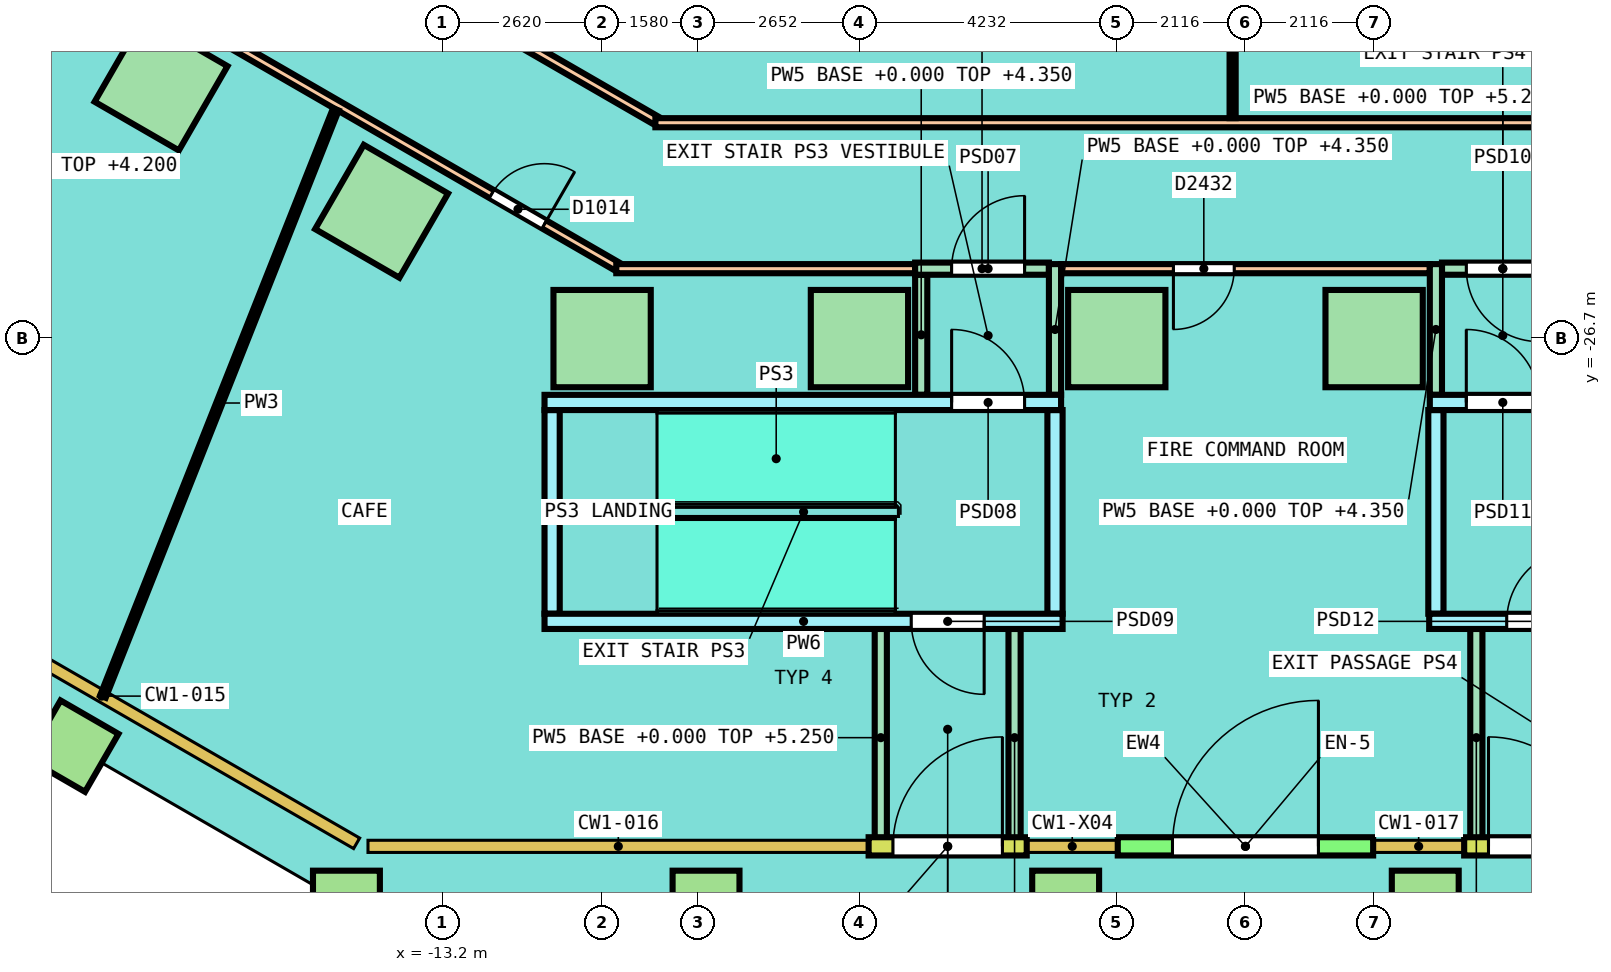
"""IFC4 building model, lengths in metres.
Left out: names, types, materials, properties, quantities, classifications, styles, units other than length and angle.
Written with IfcOpenShell. Run it as: python <this file> out.ifc"""

import sys

from ifc_helpers import new_model, si_unit, direction, frame, frame_2d, origin, origin_2d, place, context, subcontext, project, spatial, rectangle, extrude, element, fill, save


model = new_model("IFC4")
c1 = context("Model", 3, precision=1e-05, world=origin(), true_north=direction((0.0, 1.0)))
c2 = subcontext(c1, "Body", "Model", "MODEL_VIEW")
j1 = project(units=[si_unit("LENGTHUNIT", "METRE"), si_unit("PLANEANGLEUNIT", "RADIAN")], contexts=[c1])
p1 = place(None, origin())
s1 = spatial("IfcSite", under=j1, at=p1, CompositionType="ELEMENT")
p2 = place(p1, origin())
s2 = spatial("IfcBuilding", under=s1, at=p2, CompositionType="ELEMENT")
p3 = place(p2, origin())
s3 = spatial("IfcBuildingStorey", under=s2, at=p3, CompositionType="ELEMENT", Elevation=0.0)
for number, where, z_axis, x_axis in (
    (1, (-17.833, -22.512, 0.0), (0.0, 0.0, 1.0), (0.866, -0.5, 0.0)),
    (2, (-14.206, -24.606, 0.0), (0.0, 0.0, 1.0), (0.866, -0.5, 0.0)),
    (3, (-10.58, -26.7, 0.0), (0.0, 0.0, 1.0), (1.0, 0.0, 0.0)),
    (4, (-6.348, -26.7, 0.0), (0.0, 0.0, 1.0), (1.0, 0.0, 0.0)),
    (5, (-2.116, -26.7, 0.0), (0.0, 0.0, 1.0), (1.0, 0.0, 0.0)),
    (6, (2.116, -26.7, 0.0), (0.0, 0.0, 1.0), (1.0, 0.0, 0.0)),
):
    element("IfcColumn", number, at=place(p3, frame(where, z_axis=z_axis, x_axis=x_axis)), inside=s3, PredefinedType="COLUMN", context=c2, shape_type="SweptSolid", body=[
        extrude(rectangle(XDim=1.6, YDim=1.6, at=origin_2d()), origin(), (0.0, 0.0, 1.0), 5.25),
    ])
for number, where, z_axis, x_axis in (
    (7, (-19.285, -33.402, -0.35), (0.0, 0.0, 1.0), (0.866, -0.5, 0.0)),
    (8, (-14.785, -36.0, -0.35), (0.0, 0.0, 1.0), (1.0, 0.0, 0.0)),
    (9, (-8.871, -36.0, -0.35), (0.0, 0.0, 1.0), (1.0, 0.0, 0.0)),
    (10, (-2.957, -36.0, -0.35), (0.0, 0.0, 1.0), (1.0, 0.0, 0.0)),
    (11, (2.957, -36.0, -0.35), (0.0, 0.0, 1.0), (1.0, 0.0, 0.0)),
):
    element("IfcColumn", number, at=place(p3, frame(where, z_axis=z_axis, x_axis=x_axis)), inside=s3, PredefinedType="COLUMN", context=c2, shape_type="SweptSolid", body=[
        extrude(rectangle(XDim=1.1, YDim=1.1, at=origin_2d()), origin(), (0.0, 0.0, 1.0), 5.6),
    ])
p4 = place(p3, frame((-2.1, -35.05, 0.0), z_axis=(0.0, 0.0, 1.0), x_axis=(1.0, 0.0, 0.0)))
e12 = element("IfcWall", 12, at=p4, inside=s3, PredefinedType="SOLIDWALL", context=c2, shape_type="SweptSolid", body=[
    extrude(rectangle(XDim=4.2, YDim=0.3, at=frame_2d((2.1, 0.0))), origin(), (0.0, 0.0, 1.0), 5.25),
])
p5 = place(p4, frame((0.9, 0.0, 0.0)))
e13 = element("IfcOpeningElement", 13, at=p5, cuts=e12, PredefinedType="OPENING", context=c2, shape_type="SweptSolid", body=[
    extrude(rectangle(XDim=2.4, YDim=3.0, at=frame_2d((1.2, 1.5))), frame((0.0, 0.16, 0.0), z_axis=(0.0, -1.0, 0.0), x_axis=(1.0, 0.0, 0.0)), (0.0, 0.0, 1.0), 0.32),
])
p6 = place(p3, frame((-6.197, -35.05, 0.0), z_axis=(0.0, 0.0, 1.0), x_axis=(1.0, 0.0, 0.0)))
e14 = element("IfcWall", 14, at=p6, inside=s3, PredefinedType="SOLIDWALL", context=c2, shape_type="SweptSolid", body=[
    extrude(rectangle(XDim=2.6, YDim=0.3, at=frame_2d((1.3, 0.0))), origin(), (0.0, 0.0, 1.0), 5.25),
])
p7 = place(p6, frame((2.2, 0.0, 0.0), z_axis=(0.0, 0.0, 1.0), x_axis=(-1.0, 0.0, 0.0)))
e15 = element("IfcOpeningElement", 15, at=p7, cuts=e14, PredefinedType="OPENING", context=c2, shape_type="SweptSolid", body=[
    extrude(rectangle(XDim=1.8, YDim=2.4, at=frame_2d((0.9, 1.2))), frame((0.0, 0.16, 0.0), z_axis=(0.0, -1.0, 0.0), x_axis=(1.0, 0.0, 0.0)), (0.0, 0.0, 1.0), 0.32),
])
p8 = place(p3, frame((3.597, -35.05, 0.0), z_axis=(0.0, 0.0, 1.0), x_axis=(1.0, 0.0, 0.0)))
e16 = element("IfcWall", 16, at=p8, inside=s3, PredefinedType="SOLIDWALL", context=c2, shape_type="SweptSolid", body=[
    extrude(rectangle(XDim=2.6, YDim=0.3, at=frame_2d((1.3, 0.0))), origin(), (0.0, 0.0, 1.0), 5.25),
])
p9 = place(p8, frame((2.2, 0.0, 0.0), z_axis=(0.0, 0.0, 1.0), x_axis=(-1.0, 0.0, 0.0)))
e17 = element("IfcOpeningElement", 17, at=p9, cuts=e16, PredefinedType="OPENING", context=c2, shape_type="SweptSolid", body=[
    extrude(rectangle(XDim=1.8, YDim=2.4, at=frame_2d((0.9, 1.2))), frame((0.0, 0.16, 0.0), z_axis=(0.0, -1.0, 0.0), x_axis=(1.0, 0.0, 0.0)), (0.0, 0.0, 1.0), 0.32),
])
p10 = place(p3, frame((-17.056, -21.633, 0.0), z_axis=(0.0, 0.0, 1.0), x_axis=(0.866023143435, -0.50000391502, 0.0)))
e18 = element("IfcWall", 18, at=p10, inside=s3, PredefinedType="PARTITIONING", context=c2, shape_type="SweptSolid", body=[
    extrude(rectangle(XDim=7.759, YDim=0.15, at=frame_2d((3.879, 0.0))), origin(), (0.0, 0.0, 1.0), 4.2),
])
p11 = place(p10, frame((5.38, 0.0, 0.0)))
e19 = element("IfcOpeningElement", 19, at=p11, cuts=e18, PredefinedType="OPENING", context=c2, shape_type="SweptSolid", body=[
    extrude(rectangle(XDim=1.0, YDim=2.1, at=frame_2d((0.5, 1.05))), frame((0.0, 0.085, 0.0), z_axis=(0.0, -1.0, 0.0), x_axis=(1.0, 0.0, 0.0)), (0.0, 0.0, 1.0), 0.17),
])
p12 = place(p3, frame((-15.299, -19.876, 0.0), z_axis=(0.0, 0.0, 1.0), x_axis=(0.866024786089, -0.500001069878, 0.0)))
e20 = element("IfcWall", 20, at=p12, inside=s3, PredefinedType="PARTITIONING", context=c2, shape_type="SweptSolid", body=[
    extrude(rectangle(XDim=6.473, YDim=0.15, at=frame_2d((3.236, 0.0))), origin(), (0.0, 0.0, 1.0), 4.2),
])
p13 = place(p3, frame((-9.704, -23.15, 0.0), z_axis=(0.0, 0.0, 1.0), x_axis=(1.0, 0.0, 0.0)))
e21 = element("IfcWall", 21, at=p13, inside=s3, PredefinedType="PARTITIONING", context=c2, shape_type="SweptSolid", body=[
    extrude(rectangle(XDim=16.429, YDim=0.15, at=frame_2d((8.214, 0.0))), origin(), (0.0, 0.0, 1.0), 4.2),
])
p14 = place(p3, frame((-10.347, -25.55, 0.0), z_axis=(0.0, 0.0, 1.0), x_axis=(1.0, 0.0, 0.0)))
e22 = element("IfcWall", 22, at=p14, inside=s3, PredefinedType="PARTITIONING", context=c2, shape_type="SweptSolid", body=[
    extrude(rectangle(XDim=4.915, YDim=0.15, at=frame_2d((2.458, 0.0))), origin(), (0.0, 0.0, 1.0), 4.2),
])
p15 = place(p3, frame((-3.032, -25.55, 0.0), z_axis=(0.0, 0.0, 1.0), x_axis=(1.0, 0.0, 0.0)))
e23 = element("IfcWall", 23, at=p15, inside=s3, PredefinedType="PARTITIONING", context=c2, shape_type="SweptSolid", body=[
    extrude(rectangle(XDim=6.064, YDim=0.15, at=frame_2d((3.032, 0.0))), origin(), (0.0, 0.0, 1.0), 4.2),
])
p16 = place(p15, frame((1.847, 0.0, 0.0)))
e24 = element("IfcOpeningElement", 24, at=p16, cuts=e23, PredefinedType="OPENING", context=c2, shape_type="SweptSolid", body=[
    extrude(rectangle(XDim=1.0, YDim=2.1, at=frame_2d((0.5, 1.05))), frame((0.0, 0.085, 0.0), z_axis=(0.0, -1.0, 0.0), x_axis=(1.0, 0.0, 0.0)), (0.0, 0.0, 1.0), 0.17),
])
p17 = place(p3, frame((-5.332, -27.625, 0.0), z_axis=(0.0, 0.0, 1.0), x_axis=(0.0, 1.0, 0.0)))
e25 = element("IfcWall", 25, at=p17, inside=s3, PredefinedType="PARTITIONING", context=c2, shape_type="SweptSolid", body=[
    extrude(rectangle(XDim=1.975, YDim=0.2, at=frame_2d((0.988, 0.0))), origin(), (0.0, 0.0, 1.0), 4.35),
])
p18 = place(p3, frame((-5.432, -25.55, 0.0), z_axis=(0.0, 0.0, 1.0), x_axis=(1.0, 0.0, 0.0)))
e26 = element("IfcWall", 26, at=p18, inside=s3, PredefinedType="PARTITIONING", context=c2, shape_type="SweptSolid", body=[
    extrude(rectangle(XDim=2.2, YDim=0.2, at=frame_2d((1.1, 0.0))), origin(), (0.0, 0.0, 1.0), 5.25),
])
p19 = place(p18, frame((1.8, 0.0, 0.0), z_axis=(0.0, 0.0, 1.0), x_axis=(-1.0, 0.0, 0.0)))
e27 = element("IfcOpeningElement", 27, at=p19, cuts=e26, PredefinedType="OPENING", context=c2, shape_type="SweptSolid", body=[
    extrude(rectangle(XDim=1.2, YDim=2.1, at=frame_2d((0.6, 1.05))), frame((0.0, 0.11, 0.0), z_axis=(0.0, -1.0, 0.0), x_axis=(1.0, 0.0, 0.0)), (0.0, 0.0, 1.0), 0.22),
])
p20 = place(p3, frame((3.232, -25.55, 0.0), z_axis=(0.0, 0.0, 1.0), x_axis=(1.0, 0.0, 0.0)))
e28 = element("IfcWall", 28, at=p20, inside=s3, PredefinedType="PARTITIONING", context=c2, shape_type="SweptSolid", body=[
    extrude(rectangle(XDim=2.0, YDim=0.2, at=frame_2d((1.0, 0.0))), origin(), (0.0, 0.0, 1.0), 5.25),
])
p21 = place(p20, frame((1.6, 0.0, 0.0), z_axis=(0.0, 0.0, 1.0), x_axis=(-1.0, 0.0, 0.0)))
e29 = element("IfcOpeningElement", 29, at=p21, cuts=e28, PredefinedType="OPENING", context=c2, shape_type="SweptSolid", body=[
    extrude(rectangle(XDim=1.2, YDim=2.1, at=frame_2d((0.6, 1.05))), frame((0.0, 0.11, 0.0), z_axis=(0.0, -1.0, 0.0), x_axis=(1.0, 0.0, 0.0)), (0.0, 0.0, 1.0), 0.22),
])
p22 = place(p3, frame((-5.997, -35.05, 0.0), z_axis=(0.0, 0.0, 1.0), x_axis=(0.0, 1.0, 0.0)))
e30 = element("IfcWall", 30, at=p22, inside=s3, PredefinedType="PARTITIONING", context=c2, shape_type="SweptSolid", body=[
    extrude(rectangle(XDim=3.575, YDim=0.2, at=frame_2d((1.788, 0.0))), origin(), (0.0, 0.0, 1.0), 5.25),
])
p23 = place(p3, frame((-3.132, -27.625, 0.0), z_axis=(0.0, 0.0, 1.0), x_axis=(0.0, 1.0, 0.0)))
e31 = element("IfcWall", 31, at=p23, inside=s3, PredefinedType="PARTITIONING", context=c2, shape_type="SweptSolid", body=[
    extrude(rectangle(XDim=2.15, YDim=0.2, at=frame_2d((1.075, 0.0))), origin(), (0.0, 0.0, 1.0), 4.35),
])
p24 = place(p3, frame((-3.797, -35.05, 0.0), z_axis=(0.0, 0.0, 1.0), x_axis=(0.0, 1.0, 0.0)))
e32 = element("IfcWall", 32, at=p24, inside=s3, PredefinedType="PARTITIONING", context=c2, shape_type="SweptSolid", body=[
    extrude(rectangle(XDim=3.575, YDim=0.2, at=frame_2d((1.788, 0.0))), origin(), (0.0, 0.0, 1.0), 5.25),
])
p25 = place(p3, frame((3.132, -27.625, 0.0), z_axis=(0.0, 0.0, 1.0), x_axis=(0.0, 1.0, 0.0)))
e33 = element("IfcWall", 33, at=p25, inside=s3, PredefinedType="PARTITIONING", context=c2, shape_type="SweptSolid", body=[
    extrude(rectangle(XDim=2.15, YDim=0.2, at=frame_2d((1.075, 0.0))), origin(), (0.0, 0.0, 1.0), 4.35),
])
p26 = place(p3, frame((3.797, -35.05, 0.0), z_axis=(0.0, 0.0, 1.0), x_axis=(0.0, 1.0, 0.0)))
e34 = element("IfcWall", 34, at=p26, inside=s3, PredefinedType="PARTITIONING", context=c2, shape_type="SweptSolid", body=[
    extrude(rectangle(XDim=3.575, YDim=0.2, at=frame_2d((1.788, 0.0))), origin(), (0.0, 0.0, 1.0), 5.25),
])
p27 = place(p3, frame((-18.79, -32.589, 0.0), z_axis=(0.0, 0.0, 1.0), x_axis=(0.368760134438, 0.929524589911, 0.0)))
e35 = element("IfcWall", 35, at=p27, inside=s3, PredefinedType="PARTITIONING", context=c2, shape_type="SweptSolid", body=[
    extrude(rectangle(XDim=10.391, YDim=0.1, at=frame_2d((5.196, 0.0))), origin(), (0.0, 0.0, 1.0), 4.35),
])
p28 = place(p3, frame((-0.211, -23.075, 0.0), z_axis=(0.0, 0.0, 1.0), x_axis=(0.0, 1.0, 0.0)))
e36 = element("IfcWall", 36, at=p28, inside=s3, PredefinedType="PARTITIONING", context=c2, shape_type="SweptSolid", body=[
    extrude(rectangle(XDim=8.75, YDim=0.1, at=frame_2d((4.375, 0.0))), origin(), (0.0, 0.0, 1.0), 5.25),
])
for number, where, z_axis, x_axis in (
    (37, (-11.402, -31.225, 0.0), (0.0, 0.0, 1.0), (0.0, 1.0, 0.0)),
    (38, (-3.132, -31.225, 0.0), (0.0, 0.0, 1.0), (0.0, 1.0, 0.0)),
    (39, (3.132, -31.225, 0.0), (0.0, 0.0, 1.0), (0.0, 1.0, 0.0)),
):
    element("IfcWall", number, at=place(p3, frame(where, z_axis=z_axis, x_axis=x_axis)), inside=s3, PredefinedType="SOLIDWALL", context=c2, shape_type="SweptSolid", body=[
        extrude(rectangle(XDim=3.35, YDim=0.25, at=frame_2d((1.675, 0.0))), origin(), (0.0, 0.0, 1.0), 5.25),
    ])
p29 = place(p3, frame((-11.527, -27.75, 0.0), z_axis=(0.0, 0.0, 1.0), x_axis=(1.0, 0.0, 0.0)))
e40 = element("IfcWall", 40, at=p29, inside=s3, PredefinedType="SOLIDWALL", context=c2, shape_type="SweptSolid", body=[
    extrude(rectangle(XDim=8.495, YDim=0.25, at=frame_2d((4.248, 0.0))), origin(), (0.0, 0.0, 1.0), 5.25),
])
p30 = place(p29, frame((7.895, 0.0, 0.0), z_axis=(0.0, 0.0, 1.0), x_axis=(-1.0, 0.0, 0.0)))
e41 = element("IfcOpeningElement", 41, at=p30, cuts=e40, PredefinedType="OPENING", context=c2, shape_type="SweptSolid", body=[
    extrude(rectangle(XDim=1.2, YDim=2.1, at=frame_2d((0.6, 1.05))), frame((0.0, 0.135, 0.0), z_axis=(0.0, -1.0, 0.0), x_axis=(1.0, 0.0, 0.0)), (0.0, 0.0, 1.0), 0.27),
])
p31 = place(p3, frame((3.032, -27.75, 0.0), z_axis=(0.0, 0.0, 1.0), x_axis=(1.0, 0.0, 0.0)))
e42 = element("IfcWall", 42, at=p31, inside=s3, PredefinedType="SOLIDWALL", context=c2, shape_type="SweptSolid", body=[
    extrude(rectangle(XDim=8.495, YDim=0.25, at=frame_2d((4.248, 0.0))), origin(), (0.0, 0.0, 1.0), 5.25),
])
p32 = place(p31, frame((1.8, 0.0, 0.0), z_axis=(0.0, 0.0, 1.0), x_axis=(-1.0, 0.0, 0.0)))
e43 = element("IfcOpeningElement", 43, at=p32, cuts=e42, PredefinedType="OPENING", context=c2, shape_type="SweptSolid", body=[
    extrude(rectangle(XDim=1.2, YDim=2.1, at=frame_2d((0.6, 1.05))), frame((0.0, 0.135, 0.0), z_axis=(0.0, -1.0, 0.0), x_axis=(1.0, 0.0, 0.0)), (0.0, 0.0, 1.0), 0.27),
])
p33 = place(p3, frame((-11.527, -31.35, 0.0), z_axis=(0.0, 0.0, 1.0), x_axis=(1.0, 0.0, 0.0)))
e44 = element("IfcWall", 44, at=p33, inside=s3, PredefinedType="SOLIDWALL", context=c2, shape_type="SweptSolid", body=[
    extrude(rectangle(XDim=8.52, YDim=0.25, at=frame_2d((4.26, 0.0))), origin(), (0.0, 0.0, 1.0), 5.25),
])
p34 = place(p33, frame((7.23, 0.0, 0.0), z_axis=(0.0, 0.0, 1.0), x_axis=(-1.0, 0.0, 0.0)))
e45 = element("IfcOpeningElement", 45, at=p34, cuts=e44, PredefinedType="OPENING", context=c2, shape_type="SweptSolid", body=[
    extrude(rectangle(XDim=1.2, YDim=2.1, at=frame_2d((0.6, 1.05))), frame((0.0, 0.135, 0.0), z_axis=(0.0, -1.0, 0.0), x_axis=(1.0, 0.0, 0.0)), (0.0, 0.0, 1.0), 0.27),
])
p35 = place(p3, frame((3.022, -31.35, 0.0), z_axis=(0.0, 0.0, 1.0), x_axis=(1.0, 0.0, 0.0)))
e46 = element("IfcWall", 46, at=p35, inside=s3, PredefinedType="SOLIDWALL", context=c2, shape_type="SweptSolid", body=[
    extrude(rectangle(XDim=8.505, YDim=0.25, at=frame_2d((4.252, 0.0))), origin(), (0.0, 0.0, 1.0), 5.25),
])
p36 = place(p35, frame((2.475, 0.0, 0.0), z_axis=(0.0, 0.0, 1.0), x_axis=(-1.0, 0.0, 0.0)))
e47 = element("IfcOpeningElement", 47, at=p36, cuts=e46, PredefinedType="OPENING", context=c2, shape_type="SweptSolid", body=[
    extrude(rectangle(XDim=1.2, YDim=2.1, at=frame_2d((0.6, 1.05))), frame((0.0, 0.135, 0.0), z_axis=(0.0, -1.0, 0.0), x_axis=(1.0, 0.0, 0.0)), (0.0, 0.0, 1.0), 0.27),
])
p37 = place(p5, origin())
e48 = element("IfcDoor", 48, at=p37, inside=s3, OperationType="DOUBLE_DOOR_SINGLE_SWING", PredefinedType="DOOR", context=c2, shape_type="SweptSolid", body=[
    extrude(rectangle(XDim=2.4, YDim=3.0, at=frame_2d((1.2, 1.5))), frame((0.0, 0.025, 0.0), z_axis=(0.0, -1.0, 0.0), x_axis=(1.0, 0.0, 0.0)), (0.0, 0.0, 1.0), 0.05),
])
fill(e13, e48)
p38 = place(p7, origin())
e49 = element("IfcDoor", 49, at=p38, inside=s3, OperationType="DOUBLE_DOOR_SINGLE_SWING", PredefinedType="DOOR", context=c2, shape_type="SweptSolid", body=[
    extrude(rectangle(XDim=1.8, YDim=2.4, at=frame_2d((0.9, 1.2))), frame((0.0, 0.025, 0.0), z_axis=(0.0, -1.0, 0.0), x_axis=(1.0, 0.0, 0.0)), (0.0, 0.0, 1.0), 0.05),
])
fill(e15, e49)
p39 = place(p9, origin())
e50 = element("IfcDoor", 50, at=p39, inside=s3, OperationType="DOUBLE_DOOR_SINGLE_SWING", PredefinedType="DOOR", context=c2, shape_type="SweptSolid", body=[
    extrude(rectangle(XDim=1.8, YDim=2.4, at=frame_2d((0.9, 1.2))), frame((0.0, 0.025, 0.0), z_axis=(0.0, -1.0, 0.0), x_axis=(1.0, 0.0, 0.0)), (0.0, 0.0, 1.0), 0.05),
])
fill(e17, e50)
p40 = place(p11, origin())
e51 = element("IfcDoor", 51, at=p40, inside=s3, OperationType="SINGLE_SWING_RIGHT", PredefinedType="DOOR", context=c2, shape_type="SweptSolid", body=[
    extrude(rectangle(XDim=1.0, YDim=2.1, at=frame_2d((0.5, 1.05))), frame((0.0, 0.025, 0.0), z_axis=(0.0, -1.0, 0.0), x_axis=(1.0, 0.0, 0.0)), (0.0, 0.0, 1.0), 0.05),
])
fill(e19, e51)
p41 = place(p19, origin())
e52 = element("IfcDoor", 52, at=p41, inside=s3, OperationType="SINGLE_SWING_RIGHT", PredefinedType="DOOR", context=c2, shape_type="SweptSolid", body=[
    extrude(rectangle(XDim=1.2, YDim=2.1, at=frame_2d((0.6, 1.05))), frame((0.0, 0.025, 0.0), z_axis=(0.0, -1.0, 0.0), x_axis=(1.0, 0.0, 0.0)), (0.0, 0.0, 1.0), 0.05),
])
fill(e27, e52)
p42 = place(p30, origin())
e53 = element("IfcDoor", 53, at=p42, inside=s3, OperationType="SINGLE_SWING_LEFT", PredefinedType="DOOR", context=c2, shape_type="SweptSolid", body=[
    extrude(rectangle(XDim=1.2, YDim=2.1, at=frame_2d((0.6, 1.05))), frame((0.0, 0.025, 0.0), z_axis=(0.0, -1.0, 0.0), x_axis=(1.0, 0.0, 0.0)), (0.0, 0.0, 1.0), 0.05),
])
fill(e41, e53)
p43 = place(p34, origin())
e54 = element("IfcDoor", 54, at=p43, inside=s3, OperationType="SINGLE_SWING_RIGHT", PredefinedType="DOOR", context=c2, shape_type="SweptSolid", body=[
    extrude(rectangle(XDim=1.2, YDim=2.1, at=frame_2d((0.6, 1.05))), frame((0.0, 0.025, 0.0), z_axis=(0.0, -1.0, 0.0), x_axis=(1.0, 0.0, 0.0)), (0.0, 0.0, 1.0), 0.05),
])
fill(e45, e54)
p44 = place(p21, origin())
e55 = element("IfcDoor", 55, at=p44, inside=s3, OperationType="SINGLE_SWING_LEFT", PredefinedType="DOOR", context=c2, shape_type="SweptSolid", body=[
    extrude(rectangle(XDim=1.2, YDim=2.1, at=frame_2d((0.6, 1.05))), frame((0.0, 0.025, 0.0), z_axis=(0.0, -1.0, 0.0), x_axis=(1.0, 0.0, 0.0)), (0.0, 0.0, 1.0), 0.05),
])
fill(e29, e55)
p45 = place(p32, origin())
e56 = element("IfcDoor", 56, at=p45, inside=s3, OperationType="SINGLE_SWING_RIGHT", PredefinedType="DOOR", context=c2, shape_type="SweptSolid", body=[
    extrude(rectangle(XDim=1.2, YDim=2.1, at=frame_2d((0.6, 1.05))), frame((0.0, 0.025, 0.0), z_axis=(0.0, -1.0, 0.0), x_axis=(1.0, 0.0, 0.0)), (0.0, 0.0, 1.0), 0.05),
])
fill(e43, e56)
p46 = place(p36, origin())
e57 = element("IfcDoor", 57, at=p46, inside=s3, OperationType="SINGLE_SWING_LEFT", PredefinedType="DOOR", context=c2, shape_type="SweptSolid", body=[
    extrude(rectangle(XDim=1.2, YDim=2.1, at=frame_2d((0.6, 1.05))), frame((0.0, 0.025, 0.0), z_axis=(0.0, -1.0, 0.0), x_axis=(1.0, 0.0, 0.0)), (0.0, 0.0, 1.0), 0.05),
])
fill(e47, e57)
p47 = place(p16, origin())
e58 = element("IfcDoor", 58, at=p47, inside=s3, OperationType="SINGLE_SWING_RIGHT", PredefinedType="DOOR", context=c2, shape_type="SweptSolid", body=[
    extrude(rectangle(XDim=1.0, YDim=2.1, at=frame_2d((0.5, 1.05))), frame((0.0, 0.025, 0.0), z_axis=(0.0, -1.0, 0.0), x_axis=(1.0, 0.0, 0.0)), (0.0, 0.0, 1.0), 0.05),
])
fill(e24, e58)
save(model, sys.argv[1])
